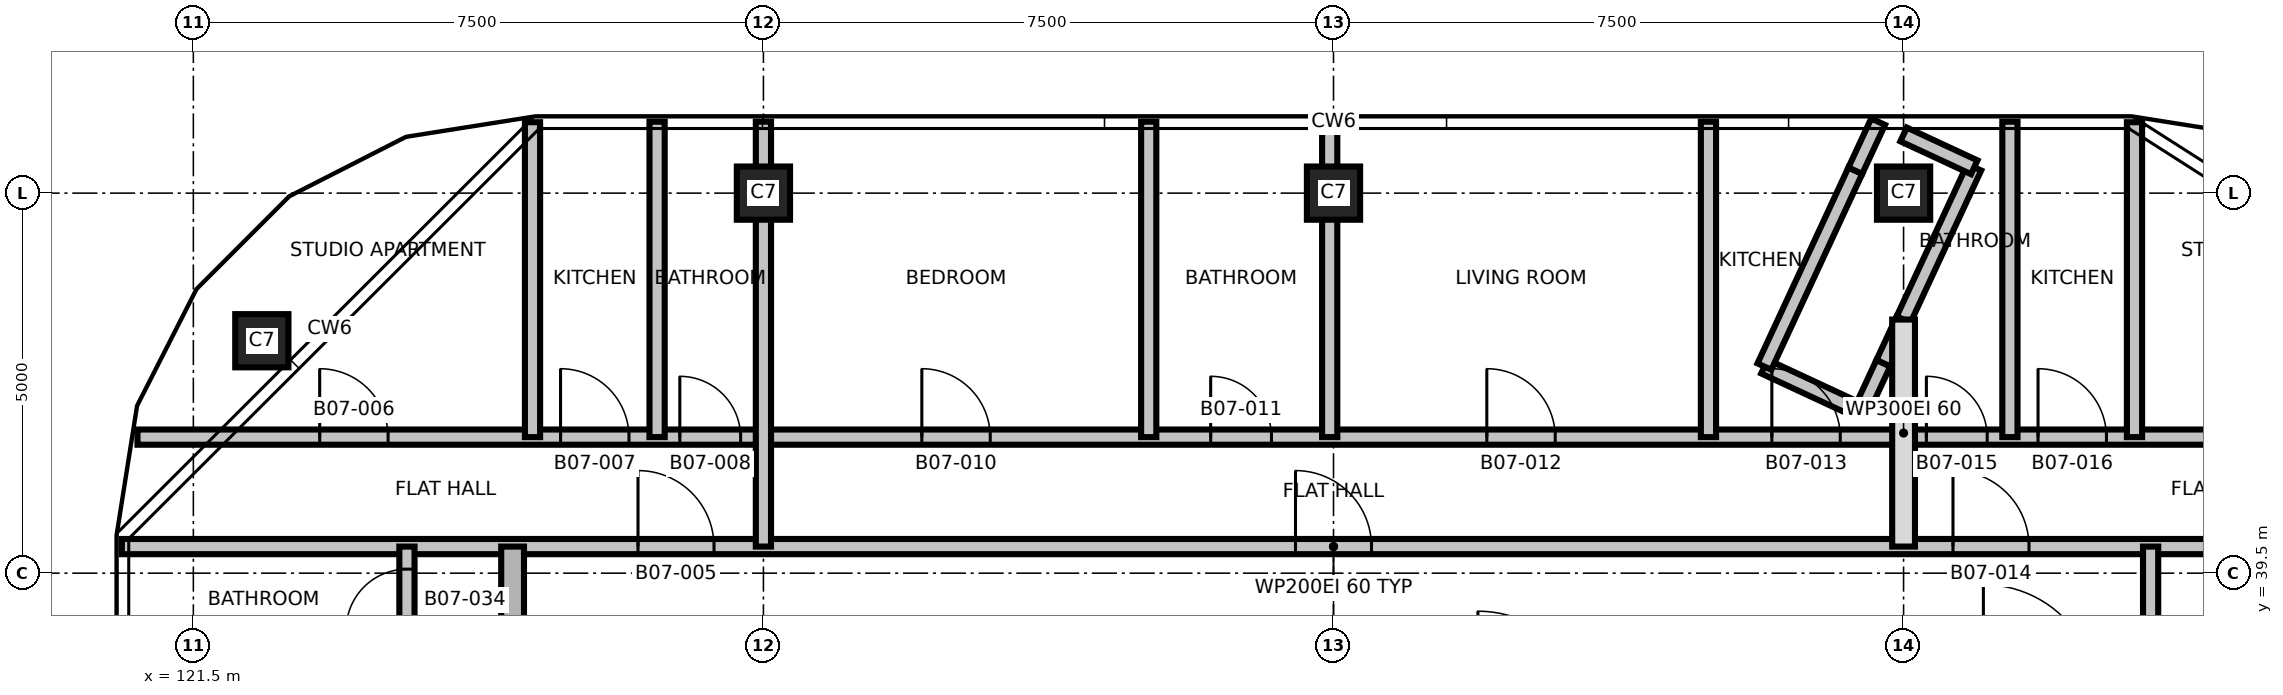
"""IFC4 building model, lengths in metres.
Left out: names, types, materials, properties, quantities, classifications, styles, units other than length and angle.
Written with IfcOpenShell. Run it as: python <this file> out.ifc"""

import sys

from ifc_helpers import new_model, si_unit, direction, frame, frame_2d, origin, origin_2d, place, context, subcontext, project, spatial, rectangle, extrude, element, fill, save


model = new_model("IFC4")
c1 = context("Model", 3, precision=1e-05, world=origin(), true_north=direction((0.0, 1.0)))
c2 = subcontext(c1, "Body", "Model", "MODEL_VIEW")
j1 = project(units=[si_unit("LENGTHUNIT", "METRE"), si_unit("PLANEANGLEUNIT", "RADIAN")], contexts=[c1])
p1 = place(None, origin())
s1 = spatial("IfcSite", under=j1, at=p1, CompositionType="ELEMENT")
p2 = place(p1, origin())
s2 = spatial("IfcBuilding", under=s1, at=p2, CompositionType="ELEMENT")
p3 = place(p2, frame((0.0, 0.0, 87.1)))
s3 = spatial("IfcBuildingStorey", under=s2, at=p3, CompositionType="ELEMENT", Elevation=87.1)
for number, where, z_axis, x_axis in (
    (1, (122.401, 42.558, 0.0), (0.0, 0.0, 1.0), (1.0, 0.0, 0.0)),
    (2, (129.0, 44.5, 0.0), (0.0, 0.0, 1.0), (1.0, 0.0, 0.0)),
    (3, (136.5, 44.5, 0.0), (0.0, 0.0, 1.0), (1.0, 0.0, 0.0)),
    (4, (144.0, 44.5, 0.0), (0.0, 0.0, 1.0), (1.0, 0.0, 0.0)),
):
    element("IfcColumn", number, at=place(p3, frame(where, z_axis=z_axis, x_axis=x_axis)), inside=s3, PredefinedType="COLUMN", context=c2, shape_type="SweptSolid", body=[
        extrude(rectangle(XDim=0.7, YDim=0.7, at=origin_2d()), origin(), (0.0, 0.0, 1.0), 3.7),
    ])
p4 = place(p3, frame((142.169, 42.218, 0.0), z_axis=(0.0, 0.0, 1.0), x_axis=(0.906890025327, -0.421367395466, 0.0)))
e5 = element("IfcWall", 5, at=p4, inside=s3, PredefinedType="PARTITIONING", context=c2, shape_type="SweptSolid", body=[
    extrude(rectangle(XDim=1.4, YDim=0.2, at=frame_2d((0.7, 0.0))), origin(), (0.0, 0.0, 1.0), 3.4),
])
p5 = place(p3, frame((142.169, 42.218, 0.0), z_axis=(0.0, 0.0, 1.0), x_axis=(0.421002733132, 0.907059368893, 0.0)))
e6 = element("IfcWall", 6, at=p5, inside=s3, PredefinedType="PARTITIONING", context=c2, shape_type="SweptSolid", body=[
    extrude(rectangle(XDim=2.841, YDim=0.2, at=frame_2d((1.42, 0.0))), origin(), (0.0, 0.0, 1.0), 3.4),
])
p6 = place(p3, frame((143.439, 41.628, 0.0), z_axis=(0.0, 0.0, 1.0), x_axis=(0.421223998033, 0.906956638148, 0.0)))
e7 = element("IfcWall", 7, at=p6, inside=s3, PredefinedType="PARTITIONING", context=c2, shape_type="SweptSolid", body=[
    extrude(rectangle(XDim=0.7, YDim=0.2, at=frame_2d((0.35, 0.0))), origin(), (0.0, 0.0, 1.0), 3.4),
])
p7 = place(p3, frame((143.365, 44.795, 0.0), z_axis=(0.0, 0.0, 1.0), x_axis=(0.421776680367, 0.90669974738, 0.0)))
e8 = element("IfcWall", 8, at=p7, inside=s3, PredefinedType="PARTITIONING", context=c2, shape_type="SweptSolid", body=[
    extrude(rectangle(XDim=0.711, YDim=0.2, at=frame_2d((0.356, 0.0))), origin(), (0.0, 0.0, 1.0), 3.4),
])
p8 = place(p3, frame((143.734, 42.263, 0.0), z_axis=(0.0, 0.0, 1.0), x_axis=(0.420623716183, 0.907235189675, 0.0)))
e9 = element("IfcWall", 9, at=p8, inside=s3, PredefinedType="PARTITIONING", context=c2, shape_type="SweptSolid", body=[
    extrude(rectangle(XDim=0.633, YDim=0.2, at=frame_2d((0.316, 0.0))), origin(), (0.0, 0.0, 1.0), 3.4),
])
p9 = place(p3, frame((144.0, 42.837, 0.0), z_axis=(0.0, 0.0, 1.0), x_axis=(0.421069082826, 0.907028570382, 0.0)))
e10 = element("IfcWall", 10, at=p9, inside=s3, PredefinedType="PARTITIONING", context=c2, shape_type="SweptSolid", body=[
    extrude(rectangle(XDim=2.208, YDim=0.2, at=frame_2d((1.104, 0.0))), origin(), (0.0, 0.0, 1.0), 3.4),
])
p10 = place(p3, frame((144.0, 45.272, 0.0), z_axis=(0.0, 0.0, 1.0), x_axis=(0.906960240365, -0.42121624185, 0.0)))
e11 = element("IfcWall", 11, at=p10, inside=s3, PredefinedType="PARTITIONING", context=c2, shape_type="SweptSolid", body=[
    extrude(rectangle(XDim=1.025, YDim=0.2, at=frame_2d((0.513, 0.0))), origin(), (0.0, 0.0, 1.0), 3.4),
])
p11 = place(p3, frame((120.56, 39.85, 0.0), z_axis=(0.0, 0.0, 1.0), x_axis=(1.0, 0.0, 0.0)))
e12 = element("IfcWall", 12, at=p11, inside=s3, PredefinedType="PARTITIONING", context=c2, shape_type="SweptSolid", body=[
    extrude(rectangle(XDim=31.88, YDim=0.2, at=frame_2d((15.94, 0.0))), origin(), (0.0, 0.0, 1.0), 3.4),
])
p12 = place(p11, frame((6.79, 0.0, 0.0)))
e13 = element("IfcOpeningElement", 13, at=p12, cuts=e12, PredefinedType="OPENING", context=c2, shape_type="SweptSolid", body=[
    extrude(rectangle(XDim=1.0, YDim=2.1, at=frame_2d((0.5, 1.05))), frame((0.0, 0.11, 0.0), z_axis=(0.0, -1.0, 0.0), x_axis=(1.0, 0.0, 0.0)), (0.0, 0.0, 1.0), 0.22),
])
p13 = place(p11, frame((15.44, 0.0, 0.0)))
e14 = element("IfcOpeningElement", 14, at=p13, cuts=e12, PredefinedType="OPENING", context=c2, shape_type="SweptSolid", body=[
    extrude(rectangle(XDim=1.0, YDim=2.1, at=frame_2d((0.5, 1.05))), frame((0.0, 0.11, 0.0), z_axis=(0.0, -1.0, 0.0), x_axis=(1.0, 0.0, 0.0)), (0.0, 0.0, 1.0), 0.22),
])
p14 = place(p11, frame((24.09, 0.0, 0.0)))
e15 = element("IfcOpeningElement", 15, at=p14, cuts=e12, PredefinedType="OPENING", context=c2, shape_type="SweptSolid", body=[
    extrude(rectangle(XDim=1.0, YDim=2.1, at=frame_2d((0.5, 1.05))), frame((0.0, 0.11, 0.0), z_axis=(0.0, -1.0, 0.0), x_axis=(1.0, 0.0, 0.0)), (0.0, 0.0, 1.0), 0.22),
])
p15 = place(p3, frame((120.765, 41.29, 0.0), z_axis=(0.0, 0.0, 1.0), x_axis=(1.0, 0.0, 0.0)))
e16 = element("IfcWall", 16, at=p15, inside=s3, PredefinedType="PARTITIONING", context=c2, shape_type="SweptSolid", body=[
    extrude(rectangle(XDim=31.47, YDim=0.2, at=frame_2d((15.735, 0.0))), origin(), (0.0, 0.0, 1.0), 3.4),
])
p16 = place(p15, frame((2.397, 0.0, 0.0)))
e17 = element("IfcOpeningElement", 17, at=p16, cuts=e16, PredefinedType="OPENING", context=c2, shape_type="SweptSolid", body=[
    extrude(rectangle(XDim=0.9, YDim=2.1, at=frame_2d((0.45, 1.05))), frame((0.0, 0.11, 0.0), z_axis=(0.0, -1.0, 0.0), x_axis=(1.0, 0.0, 0.0)), (0.0, 0.0, 1.0), 0.22),
])
p17 = place(p15, frame((5.566, 0.0, 0.0)))
e18 = element("IfcOpeningElement", 18, at=p17, cuts=e16, PredefinedType="OPENING", context=c2, shape_type="SweptSolid", body=[
    extrude(rectangle(XDim=0.9, YDim=2.1, at=frame_2d((0.45, 1.05))), frame((0.0, 0.11, 0.0), z_axis=(0.0, -1.0, 0.0), x_axis=(1.0, 0.0, 0.0)), (0.0, 0.0, 1.0), 0.22),
])
p18 = place(p15, frame((7.135, 0.0, 0.0)))
e19 = element("IfcOpeningElement", 19, at=p18, cuts=e16, PredefinedType="OPENING", context=c2, shape_type="SweptSolid", body=[
    extrude(rectangle(XDim=0.8, YDim=2.1, at=frame_2d((0.4, 1.05))), frame((0.0, 0.11, 0.0), z_axis=(0.0, -1.0, 0.0), x_axis=(1.0, 0.0, 0.0)), (0.0, 0.0, 1.0), 0.22),
])
p19 = place(p15, frame((10.319, 0.0, 0.0)))
e20 = element("IfcOpeningElement", 20, at=p19, cuts=e16, PredefinedType="OPENING", context=c2, shape_type="SweptSolid", body=[
    extrude(rectangle(XDim=0.9, YDim=2.1, at=frame_2d((0.45, 1.05))), frame((0.0, 0.11, 0.0), z_axis=(0.0, -1.0, 0.0), x_axis=(1.0, 0.0, 0.0)), (0.0, 0.0, 1.0), 0.22),
])
p20 = place(p15, frame((14.119, 0.0, 0.0)))
e21 = element("IfcOpeningElement", 21, at=p20, cuts=e16, PredefinedType="OPENING", context=c2, shape_type="SweptSolid", body=[
    extrude(rectangle(XDim=0.8, YDim=2.1, at=frame_2d((0.4, 1.05))), frame((0.0, 0.11, 0.0), z_axis=(0.0, -1.0, 0.0), x_axis=(1.0, 0.0, 0.0)), (0.0, 0.0, 1.0), 0.22),
])
p21 = place(p15, frame((17.752, 0.0, 0.0)))
e22 = element("IfcOpeningElement", 22, at=p21, cuts=e16, PredefinedType="OPENING", context=c2, shape_type="SweptSolid", body=[
    extrude(rectangle(XDim=0.9, YDim=2.1, at=frame_2d((0.45, 1.05))), frame((0.0, 0.11, 0.0), z_axis=(0.0, -1.0, 0.0), x_axis=(1.0, 0.0, 0.0)), (0.0, 0.0, 1.0), 0.22),
])
p22 = place(p15, frame((21.502, 0.0, 0.0)))
e23 = element("IfcOpeningElement", 23, at=p22, cuts=e16, PredefinedType="OPENING", context=c2, shape_type="SweptSolid", body=[
    extrude(rectangle(XDim=0.9, YDim=2.1, at=frame_2d((0.45, 1.05))), frame((0.0, 0.11, 0.0), z_axis=(0.0, -1.0, 0.0), x_axis=(1.0, 0.0, 0.0)), (0.0, 0.0, 1.0), 0.22),
])
p23 = place(p15, frame((23.535, 0.0, 0.0)))
e24 = element("IfcOpeningElement", 24, at=p23, cuts=e16, PredefinedType="OPENING", context=c2, shape_type="SweptSolid", body=[
    extrude(rectangle(XDim=0.8, YDim=2.1, at=frame_2d((0.4, 1.05))), frame((0.0, 0.11, 0.0), z_axis=(0.0, -1.0, 0.0), x_axis=(1.0, 0.0, 0.0)), (0.0, 0.0, 1.0), 0.22),
])
p24 = place(p15, frame((25.004, 0.0, 0.0)))
e25 = element("IfcOpeningElement", 25, at=p24, cuts=e16, PredefinedType="OPENING", context=c2, shape_type="SweptSolid", body=[
    extrude(rectangle(XDim=0.9, YDim=2.1, at=frame_2d((0.45, 1.05))), frame((0.0, 0.11, 0.0), z_axis=(0.0, -1.0, 0.0), x_axis=(1.0, 0.0, 0.0)), (0.0, 0.0, 1.0), 0.22),
])
p25 = place(p15, frame((28.173, 0.0, 0.0)))
e26 = element("IfcOpeningElement", 26, at=p25, cuts=e16, PredefinedType="OPENING", context=c2, shape_type="SweptSolid", body=[
    extrude(rectangle(XDim=0.9, YDim=2.1, at=frame_2d((0.45, 1.05))), frame((0.0, 0.11, 0.0), z_axis=(0.0, -1.0, 0.0), x_axis=(1.0, 0.0, 0.0)), (0.0, 0.0, 1.0), 0.22),
])
p26 = place(p3, frame((124.31, 22.15, 0.0), z_axis=(0.0, 0.0, 1.0), x_axis=(0.0, 1.0, 0.0)))
e27 = element("IfcWall", 27, at=p26, inside=s3, PredefinedType="PARTITIONING", context=c2, shape_type="SweptSolid", body=[
    extrude(rectangle(XDim=17.7, YDim=0.2, at=frame_2d((8.85, 0.0))), origin(), (0.0, 0.0, 1.0), 3.4),
])
p27 = place(p26, frame((1.725, 0.0, 0.0)))
e28 = element("IfcOpeningElement", 28, at=p27, cuts=e27, PredefinedType="OPENING", context=c2, shape_type="SweptSolid", body=[
    extrude(rectangle(XDim=0.9, YDim=2.1, at=frame_2d((0.45, 1.05))), frame((0.0, 0.11, 0.0), z_axis=(0.0, -1.0, 0.0), x_axis=(1.0, 0.0, 0.0)), (0.0, 0.0, 1.0), 0.22),
])
p28 = place(p26, frame((6.867, 0.0, 0.0)))
e29 = element("IfcOpeningElement", 29, at=p28, cuts=e27, PredefinedType="OPENING", context=c2, shape_type="SweptSolid", body=[
    extrude(rectangle(XDim=0.9, YDim=2.1, at=frame_2d((0.45, 1.05))), frame((0.0, 0.11, 0.0), z_axis=(0.0, -1.0, 0.0), x_axis=(1.0, 0.0, 0.0)), (0.0, 0.0, 1.0), 0.22),
])
p29 = place(p26, frame((11.367, 0.0, 0.0)))
e30 = element("IfcOpeningElement", 30, at=p29, cuts=e27, PredefinedType="OPENING", context=c2, shape_type="SweptSolid", body=[
    extrude(rectangle(XDim=0.9, YDim=2.1, at=frame_2d((0.45, 1.05))), frame((0.0, 0.11, 0.0), z_axis=(0.0, -1.0, 0.0), x_axis=(1.0, 0.0, 0.0)), (0.0, 0.0, 1.0), 0.22),
])
p30 = place(p26, frame((14.378, 0.0, 0.0)))
e31 = element("IfcOpeningElement", 31, at=p30, cuts=e27, PredefinedType="OPENING", context=c2, shape_type="SweptSolid", body=[
    extrude(rectangle(XDim=0.9, YDim=2.1, at=frame_2d((0.45, 1.05))), frame((0.0, 0.11, 0.0), z_axis=(0.0, -1.0, 0.0), x_axis=(1.0, 0.0, 0.0)), (0.0, 0.0, 1.0), 0.22),
])
p31 = place(p26, frame((16.603, 0.0, 0.0)))
e32 = element("IfcOpeningElement", 32, at=p31, cuts=e27, PredefinedType="OPENING", context=c2, shape_type="SweptSolid", body=[
    extrude(rectangle(XDim=0.8, YDim=2.1, at=frame_2d((0.4, 1.05))), frame((0.0, 0.11, 0.0), z_axis=(0.0, -1.0, 0.0), x_axis=(1.0, 0.0, 0.0)), (0.0, 0.0, 1.0), 0.22),
])
p32 = place(p3, frame((125.7, 22.15, 0.0), z_axis=(0.0, 0.0, 1.0), x_axis=(0.0, 1.0, 0.0)))
e33 = element("IfcWall", 33, at=p32, inside=s3, PredefinedType="SHEAR", context=c2, shape_type="SweptSolid", body=[
    extrude(rectangle(XDim=17.7, YDim=0.3, at=frame_2d((8.85, 0.0))), origin(), (0.0, 0.0, 1.0), 3.4),
])
p33 = place(p32, frame((2.7, 0.0, 0.0)))
e34 = element("IfcOpeningElement", 34, at=p33, cuts=e33, PredefinedType="OPENING", context=c2, shape_type="SweptSolid", body=[
    extrude(rectangle(XDim=1.0, YDim=2.1, at=frame_2d((0.5, 1.05))), frame((0.0, 0.16, 0.0), z_axis=(0.0, -1.0, 0.0), x_axis=(1.0, 0.0, 0.0)), (0.0, 0.0, 1.0), 0.32),
])
p34 = place(p3, frame((125.962, 41.29, 0.0), z_axis=(0.0, 0.0, 1.0), x_axis=(0.0, 1.0, 0.0)))
e35 = element("IfcWall", 35, at=p34, inside=s3, PredefinedType="PARTITIONING", context=c2, shape_type="SweptSolid", body=[
    extrude(rectangle(XDim=4.143, YDim=0.2, at=frame_2d((2.072, 0.0))), origin(), (0.0, 0.0, 1.0), 3.4),
])
p35 = place(p3, frame((127.601, 41.29, 0.0), z_axis=(0.0, 0.0, 1.0), x_axis=(0.0, 1.0, 0.0)))
e36 = element("IfcWall", 36, at=p35, inside=s3, PredefinedType="PARTITIONING", context=c2, shape_type="SweptSolid", body=[
    extrude(rectangle(XDim=4.15, YDim=0.2, at=frame_2d((2.075, 0.0))), origin(), (0.0, 0.0, 1.0), 3.4),
])
p36 = place(p3, frame((129.0, 39.85, 0.0), z_axis=(0.0, 0.0, 1.0), x_axis=(0.0, 1.0, 0.0)))
e37 = element("IfcWall", 37, at=p36, inside=s3, PredefinedType="PARTITIONING", context=c2, shape_type="SweptSolid", body=[
    extrude(rectangle(XDim=5.59, YDim=0.2, at=frame_2d((2.795, 0.0))), origin(), (0.0, 0.0, 1.0), 3.4),
])
for number, where, z_axis, x_axis in (
    (38, (134.069, 41.29, 0.0), (0.0, 0.0, 1.0), (0.0, 1.0, 0.0)),
    (39, (136.45, 41.29, 0.0), (0.0, 0.0, 1.0), (0.0, 1.0, 0.0)),
    (40, (141.433, 41.29, 0.0), (0.0, 0.0, 1.0), (0.0, 1.0, 0.0)),
):
    element("IfcWall", number, at=place(p3, frame(where, z_axis=z_axis, x_axis=x_axis)), inside=s3, PredefinedType="PARTITIONING", context=c2, shape_type="SweptSolid", body=[
        extrude(rectangle(XDim=4.15, YDim=0.2, at=frame_2d((2.075, 0.0))), origin(), (0.0, 0.0, 1.0), 3.4),
    ])
p37 = place(p3, frame((144.0, 39.85, 0.0), z_axis=(0.0, 0.0, 1.0), x_axis=(0.0, 1.0, 0.0)))
e41 = element("IfcWall", 41, at=p37, inside=s3, PredefinedType="PARTITIONING", context=c2, shape_type="SweptSolid", body=[
    extrude(rectangle(XDim=2.987, YDim=0.3, at=frame_2d((1.493, 0.0))), origin(), (0.0, 0.0, 1.0), 3.4),
])
p38 = place(p3, frame((145.399, 41.29, 0.0), z_axis=(0.0, 0.0, 1.0), x_axis=(0.0, 1.0, 0.0)))
e42 = element("IfcWall", 42, at=p38, inside=s3, PredefinedType="PARTITIONING", context=c2, shape_type="SweptSolid", body=[
    extrude(rectangle(XDim=4.15, YDim=0.2, at=frame_2d((2.075, 0.0))), origin(), (0.0, 0.0, 1.0), 3.4),
])
p39 = place(p3, frame((147.038, 41.29, 0.0), z_axis=(0.0, 0.0, 1.0), x_axis=(0.0, 1.0, 0.0)))
e43 = element("IfcWall", 43, at=p39, inside=s3, PredefinedType="PARTITIONING", context=c2, shape_type="SweptSolid", body=[
    extrude(rectangle(XDim=4.143, YDim=0.2, at=frame_2d((2.072, 0.0))), origin(), (0.0, 0.0, 1.0), 3.4),
])
p40 = place(p3, frame((147.25, 22.15, 0.0), z_axis=(0.0, 0.0, 1.0), x_axis=(0.0, 1.0, 0.0)))
e44 = element("IfcWall", 44, at=p40, inside=s3, PredefinedType="PARTITIONING", context=c2, shape_type="SweptSolid", body=[
    extrude(rectangle(XDim=17.7, YDim=0.2, at=frame_2d((8.85, 0.0))), origin(), (0.0, 0.0, 1.0), 3.4),
])
p41 = place(p40, frame((2.65, 0.0, 0.0)))
e45 = element("IfcOpeningElement", 45, at=p41, cuts=e44, PredefinedType="OPENING", context=c2, shape_type="SweptSolid", body=[
    extrude(rectangle(XDim=1.0, YDim=2.1, at=frame_2d((0.5, 1.05))), frame((0.0, 0.11, 0.0), z_axis=(0.0, -1.0, 0.0), x_axis=(1.0, 0.0, 0.0)), (0.0, 0.0, 1.0), 0.22),
])
p42 = place(p12, origin())
e46 = element("IfcDoor", 46, at=p42, inside=s3, OperationType="SINGLE_SWING_LEFT", PredefinedType="DOOR", context=c2, shape_type="SweptSolid", body=[
    extrude(rectangle(XDim=1.0, YDim=2.1, at=frame_2d((0.5, 1.05))), frame((0.0, 0.025, 0.0), z_axis=(0.0, -1.0, 0.0), x_axis=(1.0, 0.0, 0.0)), (0.0, 0.0, 1.0), 0.05),
])
fill(e13, e46)
p43 = place(p16, origin())
e47 = element("IfcDoor", 47, at=p43, inside=s3, OperationType="SINGLE_SWING_RIGHT", PredefinedType="DOOR", context=c2, shape_type="SweptSolid", body=[
    extrude(rectangle(XDim=0.9, YDim=2.1, at=frame_2d((0.45, 1.05))), frame((0.0, 0.025, 0.0), z_axis=(0.0, -1.0, 0.0), x_axis=(1.0, 0.0, 0.0)), (0.0, 0.0, 1.0), 0.05),
])
fill(e17, e47)
p44 = place(p17, origin())
e48 = element("IfcDoor", 48, at=p44, inside=s3, OperationType="SINGLE_SWING_LEFT", PredefinedType="DOOR", context=c2, shape_type="SweptSolid", body=[
    extrude(rectangle(XDim=0.9, YDim=2.1, at=frame_2d((0.45, 1.05))), frame((0.0, 0.025, 0.0), z_axis=(0.0, -1.0, 0.0), x_axis=(1.0, 0.0, 0.0)), (0.0, 0.0, 1.0), 0.05),
])
fill(e18, e48)
p45 = place(p18, origin())
e49 = element("IfcDoor", 49, at=p45, inside=s3, OperationType="SINGLE_SWING_RIGHT", PredefinedType="DOOR", context=c2, shape_type="SweptSolid", body=[
    extrude(rectangle(XDim=0.8, YDim=2.1, at=frame_2d((0.4, 1.05))), frame((0.0, 0.025, 0.0), z_axis=(0.0, -1.0, 0.0), x_axis=(1.0, 0.0, 0.0)), (0.0, 0.0, 1.0), 0.05),
])
fill(e19, e49)
p46 = place(p13, origin())
e50 = element("IfcDoor", 50, at=p46, inside=s3, OperationType="SINGLE_SWING_LEFT", PredefinedType="DOOR", context=c2, shape_type="SweptSolid", body=[
    extrude(rectangle(XDim=1.0, YDim=2.1, at=frame_2d((0.5, 1.05))), frame((0.0, 0.025, 0.0), z_axis=(0.0, -1.0, 0.0), x_axis=(1.0, 0.0, 0.0)), (0.0, 0.0, 1.0), 0.05),
])
fill(e14, e50)
p47 = place(p19, origin())
e51 = element("IfcDoor", 51, at=p47, inside=s3, OperationType="SINGLE_SWING_RIGHT", PredefinedType="DOOR", context=c2, shape_type="SweptSolid", body=[
    extrude(rectangle(XDim=0.9, YDim=2.1, at=frame_2d((0.45, 1.05))), frame((0.0, 0.025, 0.0), z_axis=(0.0, -1.0, 0.0), x_axis=(1.0, 0.0, 0.0)), (0.0, 0.0, 1.0), 0.05),
])
fill(e20, e51)
p48 = place(p20, origin())
e52 = element("IfcDoor", 52, at=p48, inside=s3, OperationType="SINGLE_SWING_LEFT", PredefinedType="DOOR", context=c2, shape_type="SweptSolid", body=[
    extrude(rectangle(XDim=0.8, YDim=2.1, at=frame_2d((0.4, 1.05))), frame((0.0, 0.025, 0.0), z_axis=(0.0, -1.0, 0.0), x_axis=(1.0, 0.0, 0.0)), (0.0, 0.0, 1.0), 0.05),
])
fill(e21, e52)
p49 = place(p21, origin())
e53 = element("IfcDoor", 53, at=p49, inside=s3, OperationType="SINGLE_SWING_RIGHT", PredefinedType="DOOR", context=c2, shape_type="SweptSolid", body=[
    extrude(rectangle(XDim=0.9, YDim=2.1, at=frame_2d((0.45, 1.05))), frame((0.0, 0.025, 0.0), z_axis=(0.0, -1.0, 0.0), x_axis=(1.0, 0.0, 0.0)), (0.0, 0.0, 1.0), 0.05),
])
fill(e22, e53)
p50 = place(p22, origin())
e54 = element("IfcDoor", 54, at=p50, inside=s3, OperationType="SINGLE_SWING_LEFT", PredefinedType="DOOR", context=c2, shape_type="SweptSolid", body=[
    extrude(rectangle(XDim=0.9, YDim=2.1, at=frame_2d((0.45, 1.05))), frame((0.0, 0.025, 0.0), z_axis=(0.0, -1.0, 0.0), x_axis=(1.0, 0.0, 0.0)), (0.0, 0.0, 1.0), 0.05),
])
fill(e23, e54)
p51 = place(p14, origin())
e55 = element("IfcDoor", 55, at=p51, inside=s3, OperationType="SINGLE_SWING_RIGHT", PredefinedType="DOOR", context=c2, shape_type="SweptSolid", body=[
    extrude(rectangle(XDim=1.0, YDim=2.1, at=frame_2d((0.5, 1.05))), frame((0.0, 0.025, 0.0), z_axis=(0.0, -1.0, 0.0), x_axis=(1.0, 0.0, 0.0)), (0.0, 0.0, 1.0), 0.05),
])
fill(e15, e55)
p52 = place(p23, origin())
e56 = element("IfcDoor", 56, at=p52, inside=s3, OperationType="SINGLE_SWING_LEFT", PredefinedType="DOOR", context=c2, shape_type="SweptSolid", body=[
    extrude(rectangle(XDim=0.8, YDim=2.1, at=frame_2d((0.4, 1.05))), frame((0.0, 0.025, 0.0), z_axis=(0.0, -1.0, 0.0), x_axis=(1.0, 0.0, 0.0)), (0.0, 0.0, 1.0), 0.05),
])
fill(e24, e56)
p53 = place(p24, origin())
e57 = element("IfcDoor", 57, at=p53, inside=s3, OperationType="SINGLE_SWING_RIGHT", PredefinedType="DOOR", context=c2, shape_type="SweptSolid", body=[
    extrude(rectangle(XDim=0.9, YDim=2.1, at=frame_2d((0.45, 1.05))), frame((0.0, 0.025, 0.0), z_axis=(0.0, -1.0, 0.0), x_axis=(1.0, 0.0, 0.0)), (0.0, 0.0, 1.0), 0.05),
])
fill(e25, e57)
p54 = place(p31, origin())
e58 = element("IfcDoor", 58, at=p54, inside=s3, OperationType="SINGLE_SWING_RIGHT", PredefinedType="DOOR", context=c2, shape_type="SweptSolid", body=[
    extrude(rectangle(XDim=0.8, YDim=2.1, at=frame_2d((0.4, 1.05))), frame((0.0, 0.025, 0.0), z_axis=(0.0, -1.0, 0.0), x_axis=(1.0, 0.0, 0.0)), (0.0, 0.0, 1.0), 0.05),
])
fill(e32, e58)
save(model, sys.argv[1])
